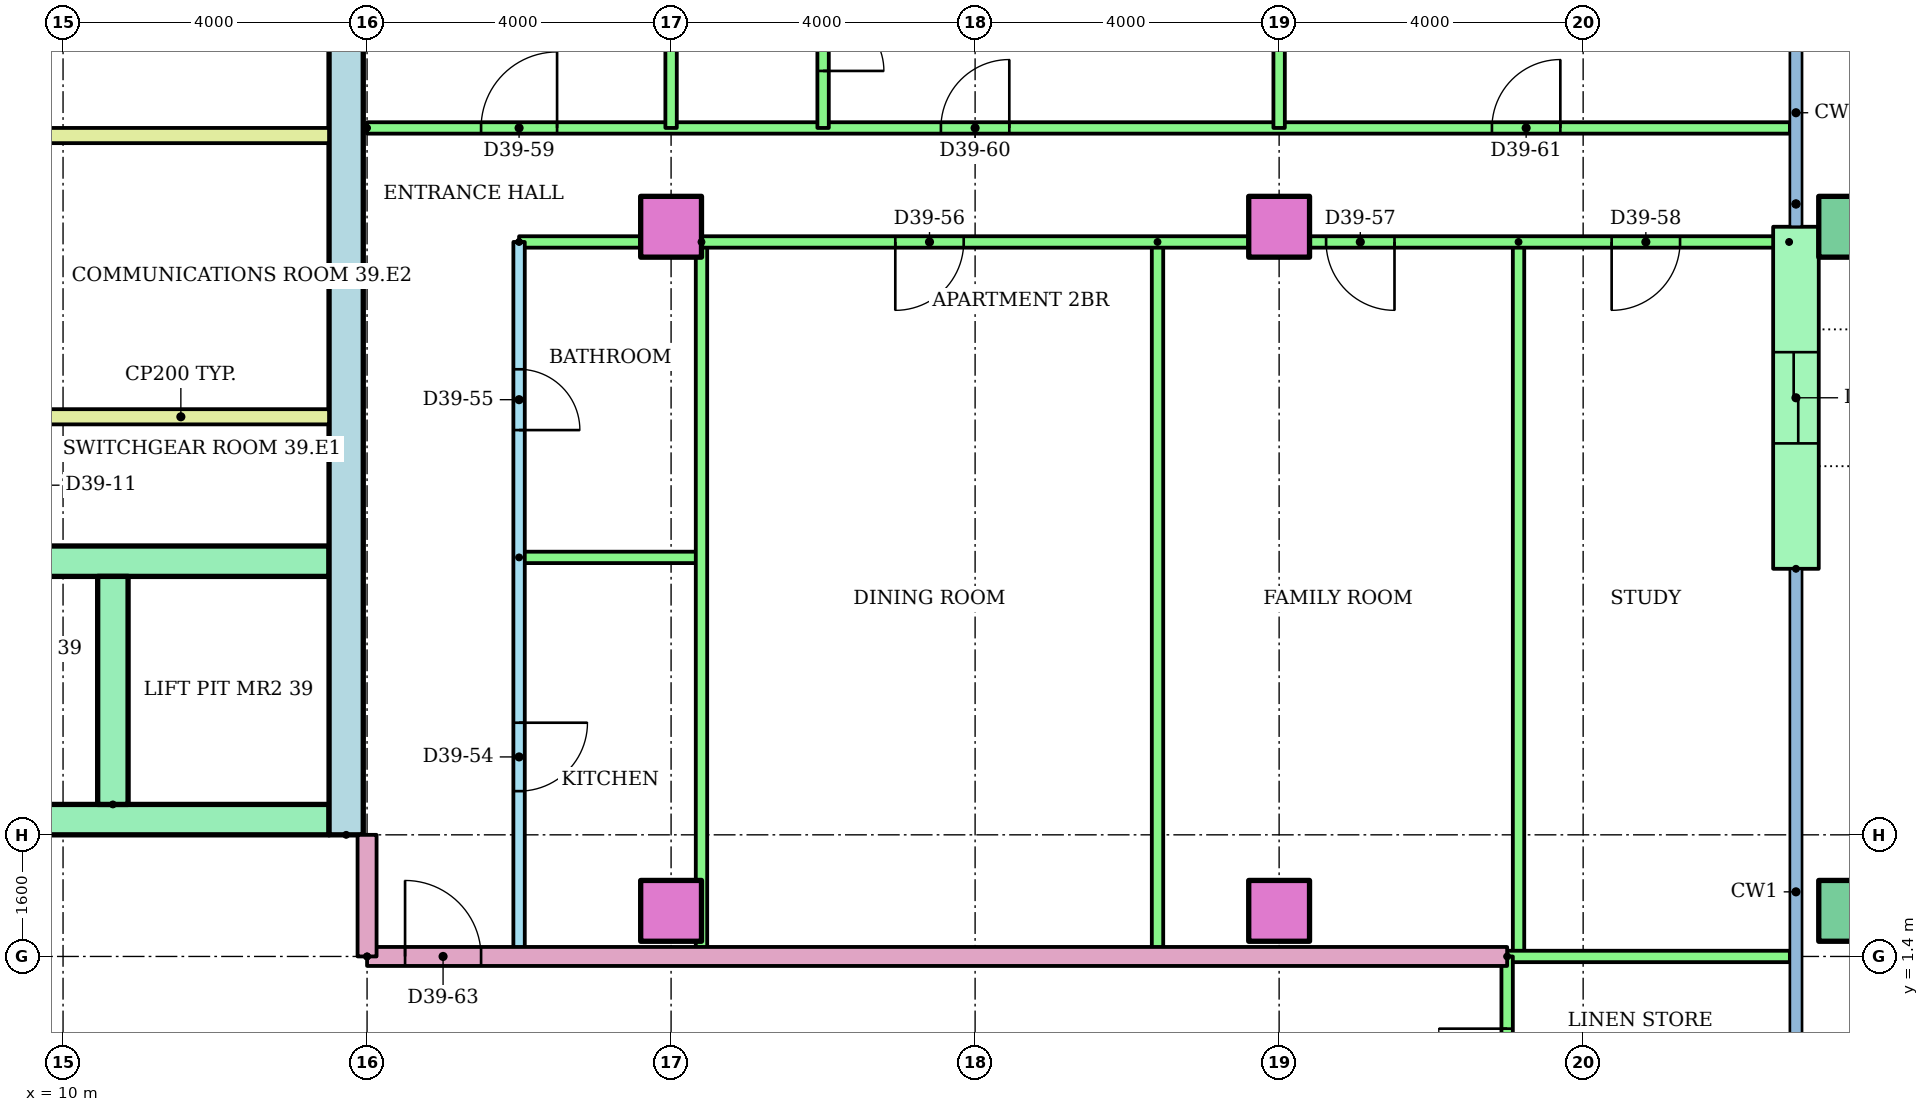
"""IFC4 building model, lengths in metres.
Left out: names, types, materials, properties, quantities, classifications, styles, units other than length and angle.
Written with IfcOpenShell. Run it as: python <this file> out.ifc"""

import sys

from ifc_helpers import new_model, si_unit, direction, frame, frame_2d, origin, origin_2d, place, context, subcontext, project, spatial, rectangle, hollow_rectangle, extrude, element, fill, save


model = new_model("IFC4")
c1 = context("Model", 3, precision=1e-05, world=origin(), true_north=direction((0.0, 1.0)))
c2 = subcontext(c1, "Body", "Model", "MODEL_VIEW")
j1 = project(units=[si_unit("LENGTHUNIT", "METRE"), si_unit("PLANEANGLEUNIT", "RADIAN")], contexts=[c1])
p1 = place(None, origin())
s1 = spatial("IfcSite", under=j1, at=p1, CompositionType="ELEMENT")
p2 = place(p1, origin())
s2 = spatial("IfcBuilding", under=s1, at=p2, CompositionType="ELEMENT")
p3 = place(p2, frame((0.0, 0.0, 148.6)))
s3 = spatial("IfcBuildingStorey", under=s2, at=p3, CompositionType="ELEMENT", Elevation=148.6)
for number, where in (
    (1, (18.0, 2.0, 0.0)),
    (2, (26.0, 2.0, 0.0)),
):
    element("IfcColumn", number, at=place(p3, frame(where)), inside=s3, PredefinedType="COLUMN", context=c2, shape_type="SweptSolid", body=[
        extrude(rectangle(XDim=0.8, YDim=0.8, at=origin_2d()), origin(), (0.0, 0.0, 1.0), 3.2),
    ])
p4 = place(p3, frame((33.5, 2.0, 0.0)))
e3 = element("IfcColumn", 3, at=p4, inside=s3, PredefinedType="COLUMN", context=c2, shape_type="SweptSolid", body=[
    extrude(hollow_rectangle(XDim=0.8, YDim=0.8, WallThickness=0.04, at=origin_2d()), origin(), (0.0, 0.0, 1.0), 3.2),
])
for number, where in (
    (4, (18.0, 11.0, 0.0)),
    (5, (26.0, 11.0, 0.0)),
):
    element("IfcColumn", number, at=place(p3, frame(where)), inside=s3, PredefinedType="COLUMN", context=c2, shape_type="SweptSolid", body=[
        extrude(rectangle(XDim=0.8, YDim=0.8, at=origin_2d()), origin(), (0.0, 0.0, 1.0), 3.2),
    ])
p5 = place(p3, frame((33.5, 11.0, 0.0)))
e6 = element("IfcColumn", 6, at=p5, inside=s3, PredefinedType="COLUMN", context=c2, shape_type="SweptSolid", body=[
    extrude(hollow_rectangle(XDim=0.8, YDim=0.8, WallThickness=0.04, at=origin_2d()), origin(), (0.0, 0.0, 1.0), 3.2),
])
p6 = place(p3, frame((32.8, 6.5, 0.0), z_axis=(0.0, 0.0, 1.0), x_axis=(0.0, 1.0, 0.0)))
e7 = element("IfcWall", 7, at=p6, inside=s3, PredefinedType="STANDARD", context=c2, shape_type="SweptSolid", body=[
    extrude(rectangle(XDim=4.5, YDim=0.6, at=frame_2d((2.25, 0.0))), origin(), (0.0, 0.0, 1.0), 2.8),
])
p7 = place(p6, frame((1.65, 0.0, 0.0)))
e8 = element("IfcOpeningElement", 8, at=p7, cuts=e7, PredefinedType="OPENING", context=c2, shape_type="SweptSolid", body=[
    extrude(rectangle(XDim=1.2, YDim=2.1, at=frame_2d((0.6, 1.05))), frame((0.0, 0.31, 0.0), z_axis=(0.0, -1.0, 0.0), x_axis=(1.0, 0.0, 0.0)), (0.0, 0.0, 1.0), 0.62),
])
p8 = place(p3, frame((13.725, 3.0, 0.0), z_axis=(0.0, 0.0, 1.0), x_axis=(0.0, 1.0, 0.0)))
e9 = element("IfcWall", 9, at=p8, inside=s3, PredefinedType="SHEAR", context=c2, shape_type="SweptSolid", body=[
    extrude(rectangle(XDim=17.0, YDim=0.45, at=frame_2d((8.5, 0.0))), origin(), (0.0, 0.0, 1.0), 2.8),
])
p9 = place(p3, frame((-13.5, 3.2, 0.0)))
e10 = element("IfcWall", 10, at=p9, inside=s3, PredefinedType="SHEAR", context=c2, shape_type="SweptSolid", body=[
    extrude(rectangle(XDim=27.0, YDim=0.4, at=frame_2d((13.5, 0.0))), origin(), (0.0, 0.0, 1.0), 2.8),
])
p10 = place(p9, frame((6.861, 0.0, 0.0)))
e11 = element("IfcOpeningElement", 11, at=p10, cuts=e10, PredefinedType="OPENING", context=c2, shape_type="SweptSolid", body=[
    extrude(rectangle(XDim=1.1, YDim=2.1, at=frame_2d((0.55, 1.05))), frame((0.0, 0.21, 0.0), z_axis=(0.0, -1.0, 0.0), x_axis=(1.0, 0.0, 0.0)), (0.0, 0.0, 1.0), 0.42),
])
p11 = place(p9, frame((9.906, 0.0, 0.0)))
e12 = element("IfcOpeningElement", 12, at=p11, cuts=e10, PredefinedType="OPENING", context=c2, shape_type="SweptSolid", body=[
    extrude(rectangle(XDim=1.1, YDim=2.1, at=frame_2d((0.55, 1.05))), frame((0.0, 0.21, 0.0), z_axis=(0.0, -1.0, 0.0), x_axis=(1.0, 0.0, 0.0)), (0.0, 0.0, 1.0), 0.42),
])
p12 = place(p9, frame((15.994, 0.0, 0.0)))
e13 = element("IfcOpeningElement", 13, at=p12, cuts=e10, PredefinedType="OPENING", context=c2, shape_type="SweptSolid", body=[
    extrude(rectangle(XDim=1.1, YDim=2.1, at=frame_2d((0.55, 1.05))), frame((0.0, 0.21, 0.0), z_axis=(0.0, -1.0, 0.0), x_axis=(1.0, 0.0, 0.0)), (0.0, 0.0, 1.0), 0.42),
])
p13 = place(p9, frame((19.039, 0.0, 0.0)))
e14 = element("IfcOpeningElement", 14, at=p13, cuts=e10, PredefinedType="OPENING", context=c2, shape_type="SweptSolid", body=[
    extrude(rectangle(XDim=1.1, YDim=2.1, at=frame_2d((0.55, 1.05))), frame((0.0, 0.21, 0.0), z_axis=(0.0, -1.0, 0.0), x_axis=(1.0, 0.0, 0.0)), (0.0, 0.0, 1.0), 0.42),
])
p14 = place(p9, frame((12.6, 0.0, 0.0)))
e15 = element("IfcOpeningElement", 15, at=p14, cuts=e10, PredefinedType="OPENING", context=c2, shape_type="SweptSolid", body=[
    extrude(rectangle(XDim=1.8, YDim=2.1, at=frame_2d((0.9, 1.05))), frame((0.0, 0.21, 0.0), z_axis=(0.0, -1.0, 0.0), x_axis=(1.0, 0.0, 0.0)), (0.0, 0.0, 1.0), 0.42),
])
p15 = place(p3, frame((1.522, 6.6, 0.0)))
e16 = element("IfcWall", 16, at=p15, inside=s3, PredefinedType="SHEAR", context=c2, shape_type="SweptSolid", body=[
    extrude(rectangle(XDim=11.978, YDim=0.4, at=frame_2d((5.989, 0.0))), origin(), (0.0, 0.0, 1.0), 2.8),
])
p16 = place(p3, frame((10.656, 3.4, 0.0), z_axis=(0.0, 0.0, 1.0), x_axis=(0.0, 1.0, 0.0)))
e17 = element("IfcWall", 17, at=p16, inside=s3, PredefinedType="SHEAR", context=c2, shape_type="SweptSolid", body=[
    extrude(rectangle(XDim=3.0, YDim=0.4, at=frame_2d((1.5, 0.0))), origin(), (0.0, 0.0, 1.0), 2.8),
])
for number, where in (
    (18, (9.6, 8.5, 0.0)),
    (19, (9.6, 12.2, 0.0)),
):
    element("IfcWall", number, at=place(p3, frame(where)), inside=s3, PredefinedType="PARTITIONING", context=c2, shape_type="SweptSolid", body=[
        extrude(rectangle(XDim=3.9, YDim=0.2, at=frame_2d((1.95, 0.0))), origin(), (0.0, 0.0, 1.0), 2.8),
    ])
p17 = place(p3, frame((16.0, 10.8, 0.0), z_axis=(0.0, 0.0, 1.0), x_axis=(0.0, -1.0, 0.0)))
e20 = element("IfcWall", 20, at=p17, inside=s3, PredefinedType="PARTITIONING", context=c2, shape_type="SweptSolid", body=[
    extrude(rectangle(XDim=9.4, YDim=0.15, at=frame_2d((4.7, 0.0))), origin(), (0.0, 0.0, 1.0), 2.4),
])
p18 = place(p17, frame((6.325, 0.0, 0.0)))
e21 = element("IfcOpeningElement", 21, at=p18, cuts=e20, PredefinedType="OPENING", context=c2, shape_type="SweptSolid", body=[
    extrude(rectangle(XDim=0.9, YDim=2.1, at=frame_2d((0.45, 1.05))), frame((0.0, 0.085, 0.0), z_axis=(0.0, -1.0, 0.0), x_axis=(1.0, 0.0, 0.0)), (0.0, 0.0, 1.0), 0.17),
])
p19 = place(p17, frame((1.675, 0.0, 0.0)))
e22 = element("IfcOpeningElement", 22, at=p19, cuts=e20, PredefinedType="OPENING", context=c2, shape_type="SweptSolid", body=[
    extrude(rectangle(XDim=0.8, YDim=2.1, at=frame_2d((0.4, 1.05))), frame((0.0, 0.085, 0.0), z_axis=(0.0, -1.0, 0.0), x_axis=(1.0, 0.0, 0.0)), (0.0, 0.0, 1.0), 0.17),
])
p20 = place(p3, frame((16.0, 6.65, 0.0)))
e23 = element("IfcWall", 23, at=p20, inside=s3, PredefinedType="PARTITIONING", context=c2, shape_type="SweptSolid", body=[
    extrude(rectangle(XDim=2.4, YDim=0.15, at=frame_2d((1.2, 0.0))), origin(), (0.0, 0.0, 1.0), 2.4),
])
for number, where, z_axis, x_axis in (
    (24, (18.4, 10.8, 0.0), (0.0, 0.0, 1.0), (0.0, -1.0, 0.0)),
    (25, (24.4, 10.8, 0.0), (0.0, 0.0, 1.0), (0.0, -1.0, 0.0)),
    (26, (29.15, 10.8, 0.0), (0.0, 0.0, 1.0), (0.0, -1.0, 0.0)),
):
    element("IfcWall", number, at=place(p3, frame(where, z_axis=z_axis, x_axis=x_axis)), inside=s3, PredefinedType="PARTITIONING", context=c2, shape_type="SweptSolid", body=[
        extrude(rectangle(XDim=9.4, YDim=0.15, at=frame_2d((4.7, 0.0))), origin(), (0.0, 0.0, 1.0), 2.4),
    ])
p21 = place(p3, frame((32.71, 10.8, 0.0), z_axis=(0.0, 0.0, 1.0), x_axis=(-1.0, 0.0, 0.0)))
e27 = element("IfcWall", 27, at=p21, inside=s3, PredefinedType="PARTITIONING", context=c2, shape_type="SweptSolid", body=[
    extrude(rectangle(XDim=16.71, YDim=0.15, at=frame_2d((8.355, 0.0))), origin(), (0.0, 0.0, 1.0), 2.4),
])
p22 = place(p21, frame((10.86, 0.0, 0.0)))
e28 = element("IfcOpeningElement", 28, at=p22, cuts=e27, PredefinedType="OPENING", context=c2, shape_type="SweptSolid", body=[
    extrude(rectangle(XDim=0.9, YDim=2.1, at=frame_2d((0.45, 1.05))), frame((0.0, 0.085, 0.0), z_axis=(0.0, -1.0, 0.0), x_axis=(1.0, 0.0, 0.0)), (0.0, 0.0, 1.0), 0.17),
])
p23 = place(p21, frame((5.192, 0.0, 0.0)))
e29 = element("IfcOpeningElement", 29, at=p23, cuts=e27, PredefinedType="OPENING", context=c2, shape_type="SweptSolid", body=[
    extrude(rectangle(XDim=0.9, YDim=2.1, at=frame_2d((0.45, 1.05))), frame((0.0, 0.085, 0.0), z_axis=(0.0, -1.0, 0.0), x_axis=(1.0, 0.0, 0.0)), (0.0, 0.0, 1.0), 0.17),
])
p24 = place(p21, frame((1.435, 0.0, 0.0)))
e30 = element("IfcOpeningElement", 30, at=p24, cuts=e27, PredefinedType="OPENING", context=c2, shape_type="SweptSolid", body=[
    extrude(rectangle(XDim=0.9, YDim=2.1, at=frame_2d((0.45, 1.05))), frame((0.0, 0.085, 0.0), z_axis=(0.0, -1.0, 0.0), x_axis=(1.0, 0.0, 0.0)), (0.0, 0.0, 1.0), 0.17),
])
p25 = place(p3, frame((14.0, 12.3, 0.0)))
e31 = element("IfcWall", 31, at=p25, inside=s3, PredefinedType="PARTITIONING", context=c2, shape_type="SweptSolid", body=[
    extrude(rectangle(XDim=18.72, YDim=0.15, at=frame_2d((9.36, 0.0))), origin(), (0.0, 0.0, 1.0), 2.4),
])
p26 = place(p25, frame((1.5, 0.0, 0.0)))
e32 = element("IfcOpeningElement", 32, at=p26, cuts=e31, PredefinedType="OPENING", context=c2, shape_type="SweptSolid", body=[
    extrude(rectangle(XDim=1.0, YDim=2.1, at=frame_2d((0.5, 1.05))), frame((0.0, 0.085, 0.0), z_axis=(0.0, -1.0, 0.0), x_axis=(1.0, 0.0, 0.0)), (0.0, 0.0, 1.0), 0.17),
])
p27 = place(p25, frame((7.55, 0.0, 0.0)))
e33 = element("IfcOpeningElement", 33, at=p27, cuts=e31, PredefinedType="OPENING", context=c2, shape_type="SweptSolid", body=[
    extrude(rectangle(XDim=0.9, YDim=2.1, at=frame_2d((0.45, 1.05))), frame((0.0, 0.085, 0.0), z_axis=(0.0, -1.0, 0.0), x_axis=(1.0, 0.0, 0.0)), (0.0, 0.0, 1.0), 0.17),
])
p28 = place(p25, frame((14.8, 0.0, 0.0)))
e34 = element("IfcOpeningElement", 34, at=p28, cuts=e31, PredefinedType="OPENING", context=c2, shape_type="SweptSolid", body=[
    extrude(rectangle(XDim=0.9, YDim=2.1, at=frame_2d((0.45, 1.05))), frame((0.0, 0.085, 0.0), z_axis=(0.0, -1.0, 0.0), x_axis=(1.0, 0.0, 0.0)), (0.0, 0.0, 1.0), 0.17),
])
for number, where, z_axis, x_axis in (
    (35, (18.0, 18.721, 0.0), (0.0, 0.0, 1.0), (0.0, -1.0, 0.0)),
    (36, (26.0, 18.721, 0.0), (0.0, 0.0, 1.0), (0.0, -1.0, 0.0)),
):
    element("IfcWall", number, at=place(p3, frame(where, z_axis=z_axis, x_axis=x_axis)), inside=s3, PredefinedType="PARTITIONING", context=c2, shape_type="SweptSolid", body=[
        extrude(rectangle(XDim=6.421, YDim=0.15, at=frame_2d((3.21, 0.0))), origin(), (0.0, 0.0, 1.0), 2.4),
    ])
p29 = place(p3, frame((20.0, 14.6, 0.0), z_axis=(0.0, 0.0, 1.0), x_axis=(0.0, -1.0, 0.0)))
e37 = element("IfcWall", 37, at=p29, inside=s3, PredefinedType="PARTITIONING", context=c2, shape_type="SweptSolid", body=[
    extrude(rectangle(XDim=2.3, YDim=0.15, at=frame_2d((1.15, 0.0))), origin(), (0.0, 0.0, 1.0), 2.4),
])
p30 = place(p29, frame((0.75, 0.0, 0.0)))
e38 = element("IfcOpeningElement", 38, at=p30, cuts=e37, PredefinedType="OPENING", context=c2, shape_type="SweptSolid", body=[
    extrude(rectangle(XDim=0.8, YDim=2.1, at=frame_2d((0.4, 1.05))), frame((0.0, 0.085, 0.0), z_axis=(0.0, -1.0, 0.0), x_axis=(1.0, 0.0, 0.0)), (0.0, 0.0, 1.0), 0.17),
])
p31 = place(p3, frame((14.0, 1.4, 0.0)))
e39 = element("IfcWall", 39, at=p31, inside=s3, PredefinedType="PARTITIONING", context=c2, shape_type="SweptSolid", body=[
    extrude(rectangle(XDim=15.0, YDim=0.25, at=frame_2d((7.5, 0.0))), origin(), (0.0, 0.0, 1.0), 2.4),
])
p32 = place(p31, frame((0.5, 0.0, 0.0)))
e40 = element("IfcOpeningElement", 40, at=p32, cuts=e39, PredefinedType="OPENING", context=c2, shape_type="SweptSolid", body=[
    extrude(rectangle(XDim=1.0, YDim=2.1, at=frame_2d((0.5, 1.05))), frame((0.0, 0.135, 0.0), z_axis=(0.0, -1.0, 0.0), x_axis=(1.0, 0.0, 0.0)), (0.0, 0.0, 1.0), 0.27),
])
p33 = place(p3, frame((29.0, 1.4, 0.0)))
e41 = element("IfcWall", 41, at=p33, inside=s3, PredefinedType="PARTITIONING", context=c2, shape_type="SweptSolid", body=[
    extrude(rectangle(XDim=3.72, YDim=0.15, at=frame_2d((1.86, 0.0))), origin(), (0.0, 0.0, 1.0), 2.4),
])
p34 = place(p3, frame((29.0, -1.4, 0.0), z_axis=(0.0, 0.0, 1.0), x_axis=(0.0, 1.0, 0.0)))
e42 = element("IfcWall", 42, at=p34, inside=s3, PredefinedType="PARTITIONING", context=c2, shape_type="SweptSolid", body=[
    extrude(rectangle(XDim=2.8, YDim=0.15, at=frame_2d((1.4, 0.0))), origin(), (0.0, 0.0, 1.0), 2.4),
])
p35 = place(p34, frame((0.95, 0.0, 0.0)))
e43 = element("IfcOpeningElement", 43, at=p35, cuts=e42, PredefinedType="OPENING", context=c2, shape_type="SweptSolid", body=[
    extrude(rectangle(XDim=0.9, YDim=2.1, at=frame_2d((0.45, 1.05))), frame((0.0, 0.085, 0.0), z_axis=(0.0, -1.0, 0.0), x_axis=(1.0, 0.0, 0.0)), (0.0, 0.0, 1.0), 0.17),
])
p36 = place(p3, frame((14.0, 1.4, 0.0), z_axis=(0.0, 0.0, 1.0), x_axis=(0.0, 1.0, 0.0)))
e44 = element("IfcWall", 44, at=p36, inside=s3, PredefinedType="PARTITIONING", context=c2, shape_type="SweptSolid", body=[
    extrude(rectangle(XDim=1.6, YDim=0.25, at=frame_2d((0.8, 0.0))), origin(), (0.0, 0.0, 1.0), 2.4),
])
p37 = place(p18, origin())
e45 = element("IfcDoor", 45, at=p37, inside=s3, OperationType="SINGLE_SWING_LEFT", PredefinedType="DOOR", context=c2, shape_type="SweptSolid", body=[
    extrude(rectangle(XDim=0.9, YDim=2.1, at=frame_2d((0.45, 1.05))), frame((0.0, 0.025, 0.0), z_axis=(0.0, -1.0, 0.0), x_axis=(1.0, 0.0, 0.0)), (0.0, 0.0, 1.0), 0.05),
])
fill(e21, e45)
p38 = place(p19, origin())
e46 = element("IfcDoor", 46, at=p38, inside=s3, OperationType="SINGLE_SWING_RIGHT", PredefinedType="DOOR", context=c2, shape_type="SweptSolid", body=[
    extrude(rectangle(XDim=0.8, YDim=2.1, at=frame_2d((0.4, 1.05))), frame((0.0, 0.025, 0.0), z_axis=(0.0, -1.0, 0.0), x_axis=(1.0, 0.0, 0.0)), (0.0, 0.0, 1.0), 0.05),
])
fill(e22, e46)
p39 = place(p22, origin())
e47 = element("IfcDoor", 47, at=p39, inside=s3, OperationType="SINGLE_SWING_RIGHT", PredefinedType="DOOR", context=c2, shape_type="SweptSolid", body=[
    extrude(rectangle(XDim=0.9, YDim=2.1, at=frame_2d((0.45, 1.05))), frame((0.0, 0.025, 0.0), z_axis=(0.0, -1.0, 0.0), x_axis=(1.0, 0.0, 0.0)), (0.0, 0.0, 1.0), 0.05),
])
fill(e28, e47)
p40 = place(p23, origin())
e48 = element("IfcDoor", 48, at=p40, inside=s3, OperationType="SINGLE_SWING_LEFT", PredefinedType="DOOR", context=c2, shape_type="SweptSolid", body=[
    extrude(rectangle(XDim=0.9, YDim=2.1, at=frame_2d((0.45, 1.05))), frame((0.0, 0.025, 0.0), z_axis=(0.0, -1.0, 0.0), x_axis=(1.0, 0.0, 0.0)), (0.0, 0.0, 1.0), 0.05),
])
fill(e29, e48)
p41 = place(p24, origin())
e49 = element("IfcDoor", 49, at=p41, inside=s3, OperationType="SINGLE_SWING_RIGHT", PredefinedType="DOOR", context=c2, shape_type="SweptSolid", body=[
    extrude(rectangle(XDim=0.9, YDim=2.1, at=frame_2d((0.45, 1.05))), frame((0.0, 0.025, 0.0), z_axis=(0.0, -1.0, 0.0), x_axis=(1.0, 0.0, 0.0)), (0.0, 0.0, 1.0), 0.05),
])
fill(e30, e49)
p42 = place(p26, origin())
e50 = element("IfcDoor", 50, at=p42, inside=s3, OperationType="SINGLE_SWING_RIGHT", PredefinedType="DOOR", context=c2, shape_type="SweptSolid", body=[
    extrude(rectangle(XDim=1.0, YDim=2.1, at=frame_2d((0.5, 1.05))), frame((0.0, 0.025, 0.0), z_axis=(0.0, -1.0, 0.0), x_axis=(1.0, 0.0, 0.0)), (0.0, 0.0, 1.0), 0.05),
])
fill(e32, e50)
p43 = place(p27, origin())
e51 = element("IfcDoor", 51, at=p43, inside=s3, OperationType="SINGLE_SWING_RIGHT", PredefinedType="DOOR", context=c2, shape_type="SweptSolid", body=[
    extrude(rectangle(XDim=0.9, YDim=2.1, at=frame_2d((0.45, 1.05))), frame((0.0, 0.025, 0.0), z_axis=(0.0, -1.0, 0.0), x_axis=(1.0, 0.0, 0.0)), (0.0, 0.0, 1.0), 0.05),
])
fill(e33, e51)
p44 = place(p28, origin())
e52 = element("IfcDoor", 52, at=p44, inside=s3, OperationType="SINGLE_SWING_RIGHT", PredefinedType="DOOR", context=c2, shape_type="SweptSolid", body=[
    extrude(rectangle(XDim=0.9, YDim=2.1, at=frame_2d((0.45, 1.05))), frame((0.0, 0.025, 0.0), z_axis=(0.0, -1.0, 0.0), x_axis=(1.0, 0.0, 0.0)), (0.0, 0.0, 1.0), 0.05),
])
fill(e34, e52)
p45 = place(p30, origin())
e53 = element("IfcDoor", 53, at=p45, inside=s3, OperationType="SINGLE_SWING_RIGHT", PredefinedType="DOOR", context=c2, shape_type="SweptSolid", body=[
    extrude(rectangle(XDim=0.8, YDim=2.1, at=frame_2d((0.4, 1.05))), frame((0.0, 0.025, 0.0), z_axis=(0.0, -1.0, 0.0), x_axis=(1.0, 0.0, 0.0)), (0.0, 0.0, 1.0), 0.05),
])
fill(e38, e53)
p46 = place(p32, origin())
e54 = element("IfcDoor", 54, at=p46, inside=s3, OperationType="SINGLE_SWING_LEFT", PredefinedType="DOOR", context=c2, shape_type="SweptSolid", body=[
    extrude(rectangle(XDim=1.0, YDim=2.1, at=frame_2d((0.5, 1.05))), frame((0.0, 0.025, 0.0), z_axis=(0.0, -1.0, 0.0), x_axis=(1.0, 0.0, 0.0)), (0.0, 0.0, 1.0), 0.05),
])
fill(e40, e54)
p47 = place(p35, origin())
e55 = element("IfcDoor", 55, at=p47, inside=s3, OperationType="SINGLE_SWING_RIGHT", PredefinedType="DOOR", context=c2, shape_type="SweptSolid", body=[
    extrude(rectangle(XDim=0.9, YDim=2.1, at=frame_2d((0.45, 1.05))), frame((0.0, 0.025, 0.0), z_axis=(0.0, -1.0, 0.0), x_axis=(1.0, 0.0, 0.0)), (0.0, 0.0, 1.0), 0.05),
])
fill(e43, e55)
p48 = place(p7, origin())
e56 = element("IfcDoor", 56, at=p48, inside=s3, OperationType="SLIDING_TO_LEFT", PredefinedType="DOOR", context=c2, shape_type="SweptSolid", body=[
    extrude(rectangle(XDim=1.2, YDim=2.1, at=frame_2d((0.6, 1.05))), frame((0.0, 0.025, 0.0), z_axis=(0.0, -1.0, 0.0), x_axis=(1.0, 0.0, 0.0)), (0.0, 0.0, 1.0), 0.05),
])
fill(e8, e56)
save(model, sys.argv[1])
